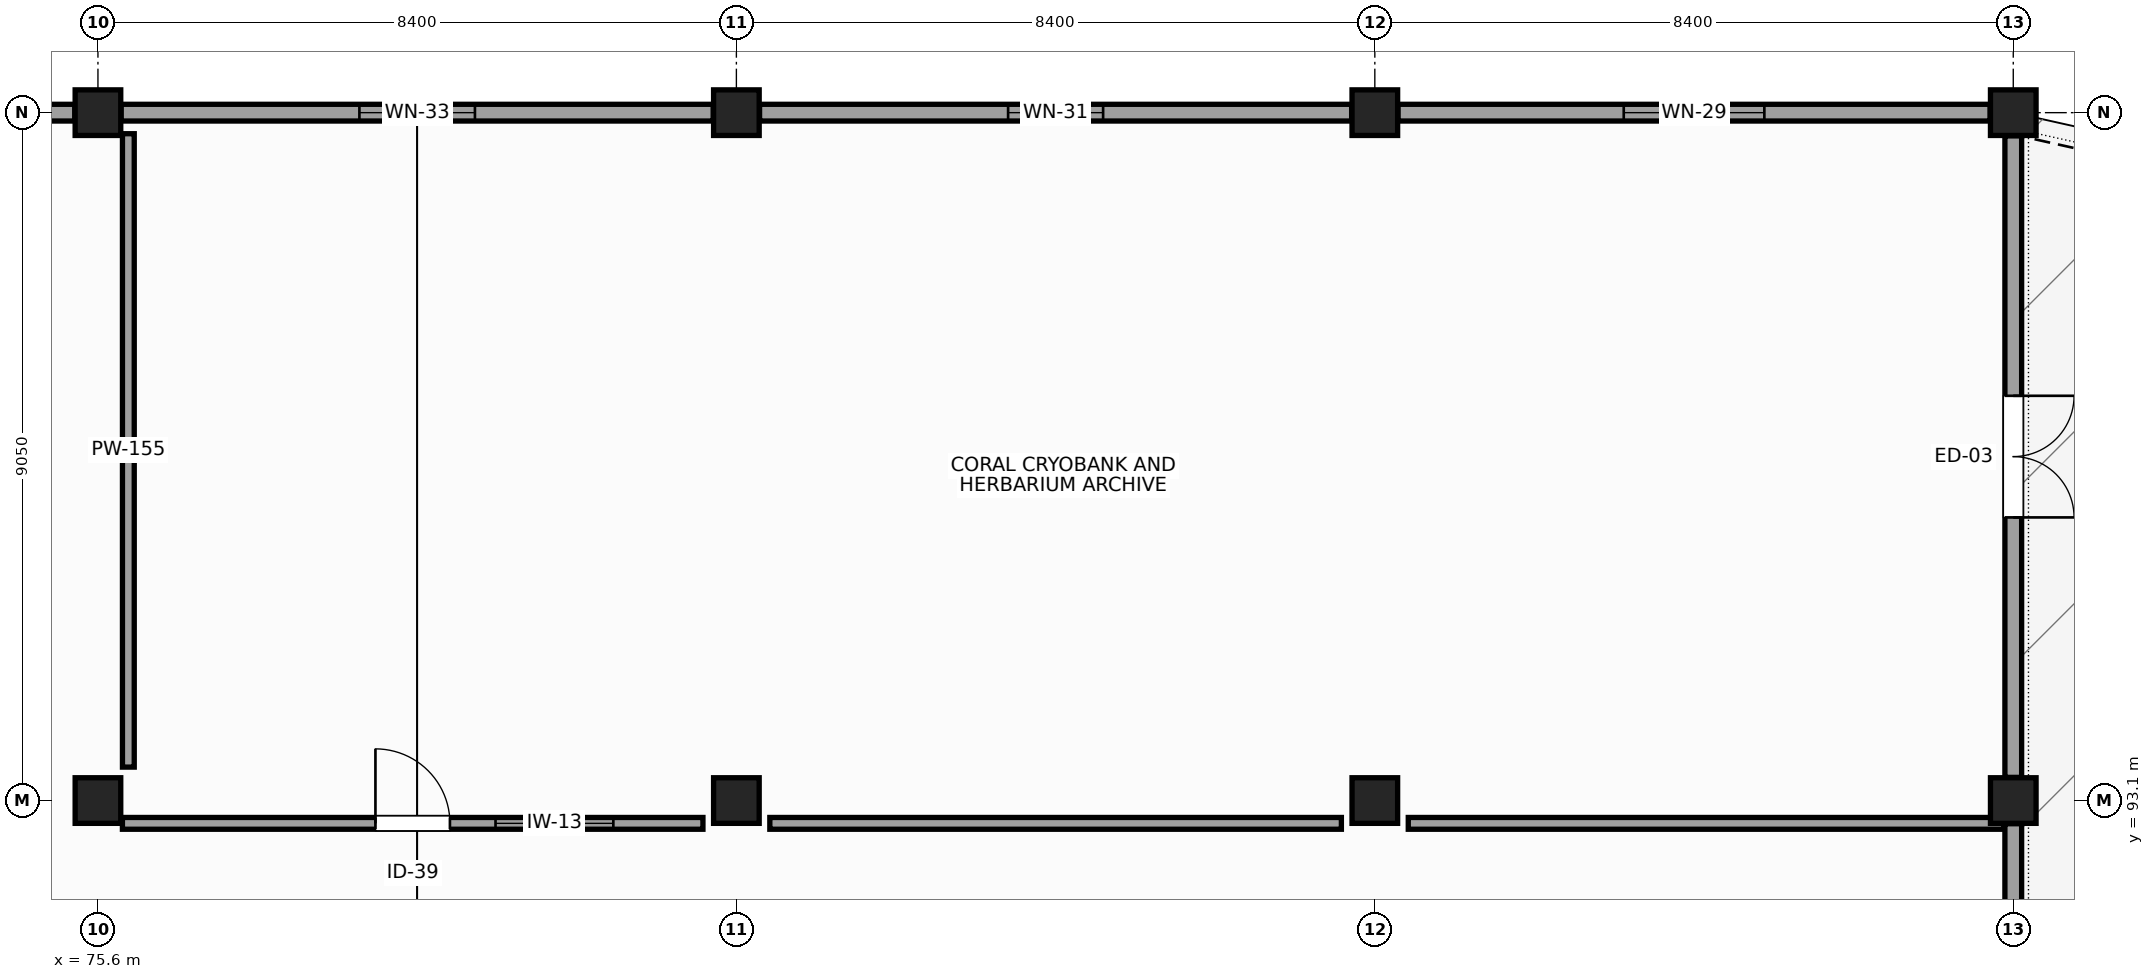
"""IFC4 building model, lengths in metres.
Left out: names, types, materials, properties, quantities, classifications, styles, units other than length and angle.
Written with IfcOpenShell. Run it as: python <this file> out.ifc"""

import sys

from ifc_helpers import new_model, si_unit, direction, frame, frame_2d, origin, origin_2d, place, context, subcontext, project, spatial, rectangle, extrude, element, fill, save


model = new_model("IFC4")
c1 = context("Model", 3, precision=1e-05, world=origin(), true_north=direction((0.0, 1.0)))
c2 = subcontext(c1, "Body", "Model", "MODEL_VIEW")
j1 = project(units=[si_unit("LENGTHUNIT", "METRE"), si_unit("PLANEANGLEUNIT", "RADIAN")], contexts=[c1])
p1 = place(None, origin())
s1 = spatial("IfcSite", under=j1, at=p1, CompositionType="ELEMENT")
p2 = place(p1, origin())
s2 = spatial("IfcBuilding", under=s1, at=p2, CompositionType="ELEMENT")
p3 = place(p2, frame((0.0, 0.0, 20.1)))
s3 = spatial("IfcBuildingStorey", under=s2, at=p3, CompositionType="ELEMENT", Elevation=20.1)
for number, where, z_axis, x_axis in (
    (1, (75.6, 93.1, 0.0), (0.0, 0.0, 1.0), (1.0, 0.0, 0.0)),
    (2, (75.6, 102.15, 0.0), (0.0, 0.0, 1.0), (1.0, 0.0, 0.0)),
    (3, (84.0, 93.1, 0.0), (0.0, 0.0, 1.0), (1.0, 0.0, 0.0)),
    (4, (84.0, 102.15, 0.0), (0.0, 0.0, 1.0), (1.0, 0.0, 0.0)),
    (5, (92.4, 93.1, 0.0), (0.0, 0.0, 1.0), (1.0, 0.0, 0.0)),
    (6, (92.4, 102.15, 0.0), (0.0, 0.0, 1.0), (1.0, 0.0, 0.0)),
    (7, (100.8, 93.1, 0.0), (0.0, 0.0, 1.0), (1.0, 0.0, 0.0)),
    (8, (100.8, 102.15, 0.0), (0.0, 0.0, 1.0), (1.0, 0.0, 0.0)),
):
    element("IfcColumn", number, at=place(p3, frame(where, z_axis=z_axis, x_axis=x_axis)), inside=s3, PredefinedType="COLUMN", context=c2, shape_type="SweptSolid", body=[
        extrude(rectangle(XDim=0.6, YDim=0.6, at=origin_2d()), origin(), (0.0, 0.0, 1.0), 4.5),
    ])
p4 = place(p3, frame((100.8, 84.355, 0.0), z_axis=(0.0, 0.0, 1.0), x_axis=(0.0, 1.0, 0.0)))
e9 = element("IfcWall", 9, at=p4, inside=s3, PredefinedType="STANDARD", context=c2, shape_type="SweptSolid", body=[
    extrude(rectangle(XDim=8.44, YDim=0.22, at=frame_2d((4.22, 0.0))), origin(), (0.0, 0.0, 1.0), 3.631),
])
p5 = place(p4, frame((3.42, 0.0, 0.0)))
e10 = element("IfcOpeningElement", 10, at=p5, cuts=e9, PredefinedType="OPENING", context=c2, shape_type="SweptSolid", body=[
    extrude(rectangle(XDim=1.6, YDim=2.25, at=frame_2d((0.8, 1.125))), frame((0.0, 0.12, 0.0), z_axis=(0.0, -1.0, 0.0), x_axis=(1.0, 0.0, 0.0)), (0.0, 0.0, 1.0), 0.24),
])
p6 = place(p3, frame((100.8, 93.405, 0.0), z_axis=(0.0, 0.0, 1.0), x_axis=(0.0, 1.0, 0.0)))
e11 = element("IfcWall", 11, at=p6, inside=s3, PredefinedType="STANDARD", context=c2, shape_type="SweptSolid", body=[
    extrude(rectangle(XDim=8.44, YDim=0.22, at=frame_2d((4.22, 0.0))), origin(), (0.0, 0.0, 1.0), 3.631),
])
p7 = place(p6, frame((3.42, 0.0, 0.0)))
e12 = element("IfcOpeningElement", 12, at=p7, cuts=e11, PredefinedType="OPENING", context=c2, shape_type="SweptSolid", body=[
    extrude(rectangle(XDim=1.6, YDim=2.25, at=frame_2d((0.8, 1.125))), frame((0.0, 0.12, 0.0), z_axis=(0.0, -1.0, 0.0), x_axis=(1.0, 0.0, 0.0)), (0.0, 0.0, 1.0), 0.24),
])
p8 = place(p3, frame((100.495, 102.15, 0.0), z_axis=(0.0, 0.0, 1.0), x_axis=(-1.0, 0.0, 0.0)))
e13 = element("IfcWall", 13, at=p8, inside=s3, PredefinedType="STANDARD", context=c2, shape_type="SweptSolid", body=[
    extrude(rectangle(XDim=7.79, YDim=0.22, at=frame_2d((3.895, 0.0))), origin(), (0.0, 0.0, 1.0), 3.631),
])
p9 = place(p8, frame((2.97, 0.0, 0.95)))
e14 = element("IfcOpeningElement", 14, at=p9, cuts=e13, PredefinedType="OPENING", context=c2, shape_type="SweptSolid", body=[
    extrude(rectangle(XDim=1.85, YDim=1.65, at=frame_2d((0.925, 0.825))), frame((0.0, 0.12, 0.0), z_axis=(0.0, -1.0, 0.0), x_axis=(1.0, 0.0, 0.0)), (0.0, 0.0, 1.0), 0.24),
])
p10 = place(p3, frame((92.095, 102.15, 0.0), z_axis=(0.0, 0.0, 1.0), x_axis=(-1.0, 0.0, 0.0)))
e15 = element("IfcWall", 15, at=p10, inside=s3, PredefinedType="STANDARD", context=c2, shape_type="SweptSolid", body=[
    extrude(rectangle(XDim=7.79, YDim=0.22, at=frame_2d((3.895, 0.0))), origin(), (0.0, 0.0, 1.0), 3.631),
])
p11 = place(p10, frame((3.27, 0.0, 0.95)))
e16 = element("IfcOpeningElement", 16, at=p11, cuts=e15, PredefinedType="OPENING", context=c2, shape_type="SweptSolid", body=[
    extrude(rectangle(XDim=1.25, YDim=1.9, at=frame_2d((0.625, 0.95))), frame((0.0, 0.12, 0.0), z_axis=(0.0, -1.0, 0.0), x_axis=(1.0, 0.0, 0.0)), (0.0, 0.0, 1.0), 0.24),
])
p12 = place(p3, frame((83.695, 102.15, 0.0), z_axis=(0.0, 0.0, 1.0), x_axis=(-1.0, 0.0, 0.0)))
e17 = element("IfcWall", 17, at=p12, inside=s3, PredefinedType="STANDARD", context=c2, shape_type="SweptSolid", body=[
    extrude(rectangle(XDim=7.79, YDim=0.22, at=frame_2d((3.895, 0.0))), origin(), (0.0, 0.0, 1.0), 3.631),
])
p13 = place(p12, frame((3.135, 0.0, 0.95)))
e18 = element("IfcOpeningElement", 18, at=p13, cuts=e17, PredefinedType="OPENING", context=c2, shape_type="SweptSolid", body=[
    extrude(rectangle(XDim=1.52, YDim=2.15, at=frame_2d((0.76, 1.075))), frame((0.0, 0.12, 0.0), z_axis=(0.0, -1.0, 0.0), x_axis=(1.0, 0.0, 0.0)), (0.0, 0.0, 1.0), 0.24),
])
p14 = place(p3, frame((75.295, 102.15, 0.0), z_axis=(0.0, 0.0, 1.0), x_axis=(-1.0, 0.0, 0.0)))
e19 = element("IfcWall", 19, at=p14, inside=s3, PredefinedType="STANDARD", context=c2, shape_type="SweptSolid", body=[
    extrude(rectangle(XDim=7.79, YDim=0.22, at=frame_2d((3.895, 0.0))), origin(), (0.0, 0.0, 1.0), 3.631),
])
p15 = place(p14, frame((2.955, 0.0, 0.95)))
e20 = element("IfcOpeningElement", 20, at=p15, cuts=e19, PredefinedType="OPENING", context=c2, shape_type="SweptSolid", body=[
    extrude(rectangle(XDim=1.88, YDim=2.18, at=frame_2d((0.94, 1.09))), frame((0.0, 0.12, 0.0), z_axis=(0.0, -1.0, 0.0), x_axis=(1.0, 0.0, 0.0)), (0.0, 0.0, 1.0), 0.24),
])
p16 = place(p3, frame((75.922, 92.8, 0.0), z_axis=(0.0, 0.0, 1.0), x_axis=(1.0, 0.0, 0.0)))
e21 = element("IfcWall", 21, at=p16, inside=s3, PredefinedType="PARTITIONING", context=c2, shape_type="SweptSolid", body=[
    extrude(rectangle(XDim=7.638, YDim=0.155, at=frame_2d((3.819, 0.0))), origin(), (0.0, 0.0, 1.0), 4.2),
])
p17 = place(p16, frame((3.329, 0.0, 0.0)))
e22 = element("IfcOpeningElement", 22, at=p17, cuts=e21, PredefinedType="OPENING", context=c2, shape_type="SweptSolid", body=[
    extrude(rectangle(XDim=0.98, YDim=2.22, at=frame_2d((0.49, 1.11))), frame((0.0, 0.087, 0.0), z_axis=(0.0, -1.0, 0.0), x_axis=(1.0, 0.0, 0.0)), (0.0, 0.0, 1.0), 0.175),
])
p18 = place(p16, frame((4.909, 0.0, 1.05)))
e23 = element("IfcOpeningElement", 23, at=p18, cuts=e21, PredefinedType="OPENING", context=c2, shape_type="SweptSolid", body=[
    extrude(rectangle(XDim=1.55, YDim=1.32, at=frame_2d((0.775, 0.66))), frame((0.0, 0.087, 0.0), z_axis=(0.0, -1.0, 0.0), x_axis=(1.0, 0.0, 0.0)), (0.0, 0.0, 1.0), 0.175),
])
p19 = place(p3, frame((84.44, 92.8, 0.0), z_axis=(0.0, 0.0, 1.0), x_axis=(1.0, 0.0, 0.0)))
e24 = element("IfcWall", 24, at=p19, inside=s3, PredefinedType="PARTITIONING", context=c2, shape_type="SweptSolid", body=[
    extrude(rectangle(XDim=7.52, YDim=0.155, at=frame_2d((3.76, 0.0))), origin(), (0.0, 0.0, 1.0), 4.2),
])
p20 = place(p3, frame((92.84, 92.8, 0.0), z_axis=(0.0, 0.0, 1.0), x_axis=(1.0, 0.0, 0.0)))
e25 = element("IfcWall", 25, at=p20, inside=s3, PredefinedType="PARTITIONING", context=c2, shape_type="SweptSolid", body=[
    extrude(rectangle(XDim=7.837, YDim=0.155, at=frame_2d((3.918, 0.0))), origin(), (0.0, 0.0, 1.0), 3.631),
])
p21 = place(p3, frame((76.0, 93.54, 0.0), z_axis=(0.0, 0.0, 1.0), x_axis=(0.0, 1.0, 0.0)))
e26 = element("IfcWall", 26, at=p21, inside=s3, PredefinedType="PARTITIONING", context=c2, shape_type="SweptSolid", body=[
    extrude(rectangle(XDim=8.333, YDim=0.155, at=frame_2d((4.167, 0.0))), origin(), (0.0, 0.0, 1.0), 3.763),
])
p22 = place(p7, frame((1.6, 0.0, 0.0), z_axis=(0.0, 0.0, 1.0), x_axis=(-1.0, 0.0, 0.0)))
e27 = element("IfcDoor", 27, at=p22, inside=s3, OperationType="DOUBLE_DOOR_SINGLE_SWING", PredefinedType="DOOR", context=c2, shape_type="SweptSolid", body=[
    extrude(rectangle(XDim=1.6, YDim=2.25, at=frame_2d((0.8, 1.125))), frame((0.0, 0.025, 0.0), z_axis=(0.0, -1.0, 0.0), x_axis=(1.0, 0.0, 0.0)), (0.0, 0.0, 1.0), 0.05),
])
fill(e12, e27)
p23 = place(p9, origin())
e28 = element("IfcWindow", 28, at=p23, inside=s3, PartitioningType="SINGLE_PANEL", PredefinedType="WINDOW", context=c2, shape_type="SweptSolid", body=[
    extrude(rectangle(XDim=1.85, YDim=1.65, at=frame_2d((0.925, 0.825))), frame((0.0, 0.03, 0.0), z_axis=(0.0, -1.0, 0.0), x_axis=(1.0, 0.0, 0.0)), (0.0, 0.0, 1.0), 0.06),
])
fill(e14, e28)
p24 = place(p11, origin())
e29 = element("IfcWindow", 29, at=p24, inside=s3, PartitioningType="SINGLE_PANEL", PredefinedType="WINDOW", context=c2, shape_type="SweptSolid", body=[
    extrude(rectangle(XDim=1.25, YDim=1.9, at=frame_2d((0.625, 0.95))), frame((0.0, 0.03, 0.0), z_axis=(0.0, -1.0, 0.0), x_axis=(1.0, 0.0, 0.0)), (0.0, 0.0, 1.0), 0.06),
])
fill(e16, e29)
p25 = place(p13, origin())
e30 = element("IfcWindow", 30, at=p25, inside=s3, PartitioningType="SINGLE_PANEL", PredefinedType="WINDOW", context=c2, shape_type="SweptSolid", body=[
    extrude(rectangle(XDim=1.52, YDim=2.15, at=frame_2d((0.76, 1.075))), frame((0.0, 0.03, 0.0), z_axis=(0.0, -1.0, 0.0), x_axis=(1.0, 0.0, 0.0)), (0.0, 0.0, 1.0), 0.06),
])
fill(e18, e30)
p26 = place(p17, origin())
e31 = element("IfcDoor", 31, at=p26, inside=s3, OperationType="SINGLE_SWING_LEFT", PredefinedType="DOOR", context=c2, shape_type="SweptSolid", body=[
    extrude(rectangle(XDim=0.98, YDim=2.22, at=frame_2d((0.49, 1.11))), frame((0.0, 0.025, 0.0), z_axis=(0.0, -1.0, 0.0), x_axis=(1.0, 0.0, 0.0)), (0.0, 0.0, 1.0), 0.05),
])
fill(e22, e31)
p27 = place(p18, origin())
e32 = element("IfcWindow", 32, at=p27, inside=s3, PartitioningType="SINGLE_PANEL", PredefinedType="WINDOW", context=c2, shape_type="SweptSolid", body=[
    extrude(rectangle(XDim=1.55, YDim=1.32, at=frame_2d((0.775, 0.66))), frame((0.0, 0.03, 0.0), z_axis=(0.0, -1.0, 0.0), x_axis=(1.0, 0.0, 0.0)), (0.0, 0.0, 1.0), 0.06),
])
fill(e23, e32)
save(model, sys.argv[1])
